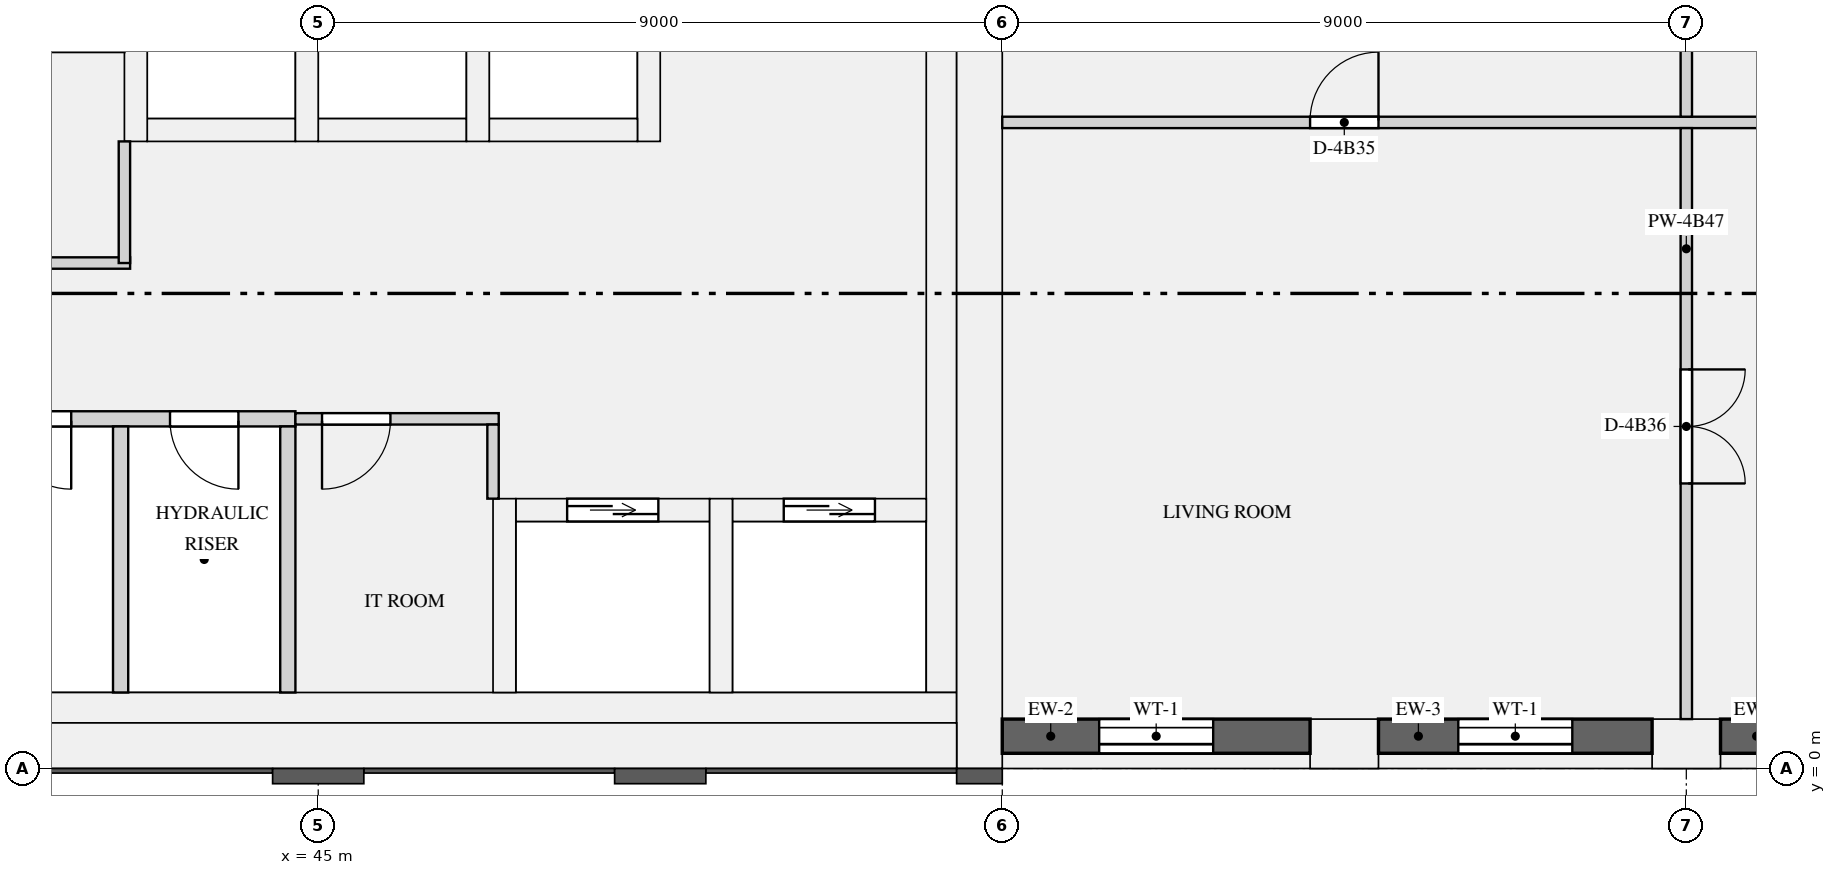
"""IFC4 building model, lengths in metres.
Left out: names, types, materials, properties, quantities, classifications, styles, units other than length and angle.
Written with IfcOpenShell. Run it as: python <this file> out.ifc"""

import sys

from ifc_helpers import new_model, si_unit, direction, frame, frame_2d, origin, origin_2d, place, context, subcontext, project, spatial, rectangle, extrude, element, fill, save


model = new_model("IFC4")
c1 = context("Model", 3, precision=1e-05, world=origin(), true_north=direction((0.0, 1.0)))
c2 = subcontext(c1, "Body", "Model", "MODEL_VIEW")
j1 = project(units=[si_unit("LENGTHUNIT", "METRE"), si_unit("PLANEANGLEUNIT", "RADIAN")], contexts=[c1])
p1 = place(None, origin())
s1 = spatial("IfcSite", under=j1, at=p1, CompositionType="ELEMENT")
p2 = place(p1, origin())
s2 = spatial("IfcBuilding", under=s1, at=p2, CompositionType="ELEMENT")
p3 = place(p2, frame((0.0, 0.0, 207.45)))
s3 = spatial("IfcBuildingStorey", under=s2, at=p3, CompositionType="ELEMENT", Elevation=207.45)
for number, where, z_axis, x_axis in (
    (1, (58.5, 0.325, 0.0), (0.0, 0.0, 1.0), (1.0, 0.0, 0.0)),
    (2, (63.0, 0.325, 0.0), (0.0, 0.0, 1.0), (1.0, 0.0, 0.0)),
):
    element("IfcColumn", number, at=place(p3, frame(where, z_axis=z_axis, x_axis=x_axis)), inside=s3, PredefinedType="USERDEFINED", context=c2, shape_type="SweptSolid", body=[
        extrude(rectangle(XDim=0.9, YDim=0.65, at=origin_2d()), origin(), (0.0, 0.0, 1.0), 3.15),
    ])
p4 = place(p3, frame((53.7, 0.0, 0.0), z_axis=(0.0, 0.0, 1.0), x_axis=(0.0, 1.0, 0.0)))
e3 = element("IfcWall", 3, at=p4, inside=s3, PredefinedType="SHEAR", context=c2, shape_type="SweptSolid", body=[
    extrude(rectangle(XDim=12.5, YDim=0.6, at=frame_2d((6.25, 0.0))), origin(), (0.0, 0.0, 1.0), 3.15),
])
p5 = place(p3, frame((18.6, 0.3, 0.0), z_axis=(0.0, 0.0, 1.0), x_axis=(1.0, 0.0, 0.0)))
e4 = element("IfcWall", 4, at=p5, inside=s3, PredefinedType="SHEAR", context=c2, shape_type="SweptSolid", body=[
    extrude(rectangle(XDim=34.8, YDim=0.6, at=frame_2d((17.4, 0.0))), origin(), (0.0, 0.0, 1.0), 3.15),
])
p6 = place(p3, frame((53.2, 1.0, 0.0), z_axis=(0.0, 0.0, 1.0), x_axis=(0.0, 1.0, 0.0)))
e5 = element("IfcWall", 5, at=p6, inside=s3, PredefinedType="SHEAR", context=c2, shape_type="SweptSolid", body=[
    extrude(rectangle(XDim=10.9, YDim=0.4, at=frame_2d((5.45, 0.0))), origin(), (0.0, 0.0, 1.0), 3.15),
])
p7 = place(p3, frame((18.6, 0.8, 0.0), z_axis=(0.0, 0.0, 1.0), x_axis=(1.0, 0.0, 0.0)))
e6 = element("IfcWall", 6, at=p7, inside=s3, PredefinedType="SHEAR", context=c2, shape_type="SweptSolid", body=[
    extrude(rectangle(XDim=34.8, YDim=0.4, at=frame_2d((17.4, 0.0))), origin(), (0.0, 0.0, 1.0), 3.15),
])
p8 = place(p3, frame((42.75, 8.4, 0.0), z_axis=(0.0, 0.0, 1.0), x_axis=(1.0, 0.0, 0.0)))
e7 = element("IfcWall", 7, at=p8, inside=s3, PredefinedType="SHEAR", context=c2, shape_type="SweptSolid", body=[
    extrude(rectangle(XDim=1.95, YDim=0.3, at=frame_2d((0.975, 0.0))), origin(), (0.0, 0.0, 1.0), 3.15),
])
p9 = place(p3, frame((42.6, 8.25, 0.0), z_axis=(0.0, 0.0, 1.0), x_axis=(0.0, 1.0, 0.0)))
e8 = element("IfcWall", 8, at=p9, inside=s3, PredefinedType="SHEAR", context=c2, shape_type="SweptSolid", body=[
    extrude(rectangle(XDim=3.65, YDim=0.3, at=frame_2d((1.825, 0.0))), origin(), (0.0, 0.0, 1.0), 3.15),
])
p10 = place(p3, frame((45.0, 8.4, 0.0), z_axis=(0.0, 0.0, 1.0), x_axis=(1.0, 0.0, 0.0)))
e9 = element("IfcWall", 9, at=p10, inside=s3, PredefinedType="SHEAR", context=c2, shape_type="SweptSolid", body=[
    extrude(rectangle(XDim=1.95, YDim=0.3, at=frame_2d((0.975, 0.0))), origin(), (0.0, 0.0, 1.0), 3.15),
])
p11 = place(p3, frame((44.85, 8.25, 0.0), z_axis=(0.0, 0.0, 1.0), x_axis=(0.0, 1.0, 0.0)))
e10 = element("IfcWall", 10, at=p11, inside=s3, PredefinedType="SHEAR", context=c2, shape_type="SweptSolid", body=[
    extrude(rectangle(XDim=3.65, YDim=0.3, at=frame_2d((1.825, 0.0))), origin(), (0.0, 0.0, 1.0), 3.15),
])
p12 = place(p3, frame((47.25, 8.4, 0.0), z_axis=(0.0, 0.0, 1.0), x_axis=(1.0, 0.0, 0.0)))
e11 = element("IfcWall", 11, at=p12, inside=s3, PredefinedType="SHEAR", context=c2, shape_type="SweptSolid", body=[
    extrude(rectangle(XDim=1.95, YDim=0.3, at=frame_2d((0.975, 0.0))), origin(), (0.0, 0.0, 1.0), 3.15),
])
for number, where, z_axis, x_axis in (
    (12, (47.1, 8.25, 0.0), (0.0, 0.0, 1.0), (0.0, 1.0, 0.0)),
    (13, (49.35, 8.25, 0.0), (0.0, 0.0, 1.0), (0.0, 1.0, 0.0)),
):
    element("IfcWall", number, at=place(p3, frame(where, z_axis=z_axis, x_axis=x_axis)), inside=s3, PredefinedType="SHEAR", context=c2, shape_type="SweptSolid", body=[
        extrude(rectangle(XDim=3.65, YDim=0.3, at=frame_2d((1.825, 0.0))), origin(), (0.0, 0.0, 1.0), 3.15),
    ])
p13 = place(p3, frame((47.6, 3.4, 0.0), z_axis=(0.0, 0.0, 1.0), x_axis=(1.0, 0.0, 0.0)))
e14 = element("IfcWall", 14, at=p13, inside=s3, PredefinedType="SHEAR", context=c2, shape_type="SweptSolid", body=[
    extrude(rectangle(XDim=2.55, YDim=0.3, at=frame_2d((1.275, 0.0))), origin(), (0.0, 0.0, 1.0), 3.15),
])
p14 = place(p13, frame((0.675, 0.0, 0.0)))
e15 = element("IfcOpeningElement", 15, at=p14, cuts=e14, PredefinedType="OPENING", context=c2, shape_type="SweptSolid", body=[
    extrude(rectangle(XDim=1.2, YDim=2.1, at=frame_2d((0.6, 1.05))), frame((0.0, 0.16, 0.0), z_axis=(0.0, -1.0, 0.0), x_axis=(1.0, 0.0, 0.0)), (0.0, 0.0, 1.0), 0.32),
])
p15 = place(p3, frame((47.45, 1.0, 0.0), z_axis=(0.0, 0.0, 1.0), x_axis=(0.0, 1.0, 0.0)))
e16 = element("IfcWall", 16, at=p15, inside=s3, PredefinedType="SHEAR", context=c2, shape_type="SweptSolid", body=[
    extrude(rectangle(XDim=2.55, YDim=0.3, at=frame_2d((1.275, 0.0))), origin(), (0.0, 0.0, 1.0), 3.15),
])
p16 = place(p3, frame((50.45, 3.4, 0.0), z_axis=(0.0, 0.0, 1.0), x_axis=(1.0, 0.0, 0.0)))
e17 = element("IfcWall", 17, at=p16, inside=s3, PredefinedType="SHEAR", context=c2, shape_type="SweptSolid", body=[
    extrude(rectangle(XDim=2.55, YDim=0.3, at=frame_2d((1.275, 0.0))), origin(), (0.0, 0.0, 1.0), 3.15),
])
p17 = place(p16, frame((0.675, 0.0, 0.0)))
e18 = element("IfcOpeningElement", 18, at=p17, cuts=e17, PredefinedType="OPENING", context=c2, shape_type="SweptSolid", body=[
    extrude(rectangle(XDim=1.2, YDim=2.1, at=frame_2d((0.6, 1.05))), frame((0.0, 0.16, 0.0), z_axis=(0.0, -1.0, 0.0), x_axis=(1.0, 0.0, 0.0)), (0.0, 0.0, 1.0), 0.32),
])
p18 = place(p3, frame((50.3, 1.0, 0.0), z_axis=(0.0, 0.0, 1.0), x_axis=(0.0, 1.0, 0.0)))
e19 = element("IfcWall", 19, at=p18, inside=s3, PredefinedType="SHEAR", context=c2, shape_type="SweptSolid", body=[
    extrude(rectangle(XDim=2.55, YDim=0.3, at=frame_2d((1.275, 0.0))), origin(), (0.0, 0.0, 1.0), 3.15),
])
p19 = place(p3, frame((54.0, 0.425, 0.9), z_axis=(0.0, 0.0, 1.0), x_axis=(1.0, 0.0, 0.0)))
e20 = element("IfcWall", 20, at=p19, inside=s3, PredefinedType="SOLIDWALL", context=c2, shape_type="SweptSolid", body=[
    extrude(rectangle(XDim=4.05, YDim=0.45, at=frame_2d((2.025, 0.0))), origin(), (0.0, 0.0, 1.0), 1.93),
])
p20 = place(p19, frame((1.275, 0.0, 0.15)))
e21 = element("IfcOpeningElement", 21, at=p20, cuts=e20, PredefinedType="OPENING", context=c2, shape_type="SweptSolid", body=[
    extrude(rectangle(XDim=1.5, YDim=1.5, at=frame_2d((0.75, 0.75))), frame((0.0, 0.235, 0.0), z_axis=(0.0, -1.0, 0.0), x_axis=(1.0, 0.0, 0.0)), (0.0, 0.0, 1.0), 0.47),
])
p21 = place(p3, frame((58.95, 0.425, 0.9), z_axis=(0.0, 0.0, 1.0), x_axis=(1.0, 0.0, 0.0)))
e22 = element("IfcWall", 22, at=p21, inside=s3, PredefinedType="SOLIDWALL", context=c2, shape_type="SweptSolid", body=[
    extrude(rectangle(XDim=3.6, YDim=0.45, at=frame_2d((1.8, 0.0))), origin(), (0.0, 0.0, 1.0), 1.93),
])
p22 = place(p21, frame((1.05, 0.0, 0.15)))
e23 = element("IfcOpeningElement", 23, at=p22, cuts=e22, PredefinedType="OPENING", context=c2, shape_type="SweptSolid", body=[
    extrude(rectangle(XDim=1.5, YDim=1.5, at=frame_2d((0.75, 0.75))), frame((0.0, 0.235, 0.0), z_axis=(0.0, -1.0, 0.0), x_axis=(1.0, 0.0, 0.0)), (0.0, 0.0, 1.0), 0.47),
])
p23 = place(p3, frame((63.45, 0.425, 0.9), z_axis=(0.0, 0.0, 1.0), x_axis=(1.0, 0.0, 0.0)))
e24 = element("IfcWall", 24, at=p23, inside=s3, PredefinedType="SOLIDWALL", context=c2, shape_type="SweptSolid", body=[
    extrude(rectangle(XDim=3.4, YDim=0.45, at=frame_2d((1.7, 0.0))), origin(), (0.0, 0.0, 1.0), 1.93),
])
p24 = place(p23, frame((0.95, 0.0, 0.15)))
e25 = element("IfcOpeningElement", 25, at=p24, cuts=e24, PredefinedType="OPENING", context=c2, shape_type="SweptSolid", body=[
    extrude(rectangle(XDim=1.5, YDim=1.5, at=frame_2d((0.75, 0.75))), frame((0.0, 0.235, 0.0), z_axis=(0.0, -1.0, 0.0), x_axis=(1.0, 0.0, 0.0)), (0.0, 0.0, 1.0), 0.47),
])
p25 = place(p3, frame((40.2, 4.6, 0.0), z_axis=(0.0, 0.0, 1.0), x_axis=(1.0, 0.0, 0.0)))
e26 = element("IfcWall", 26, at=p25, inside=s3, PredefinedType="PARTITIONING", context=c2, shape_type="SweptSolid", body=[
    extrude(rectangle(XDim=4.5, YDim=0.2, at=frame_2d((2.25, 0.0))), origin(), (0.0, 0.0, 1.0), 2.83),
])
p26 = place(p25, frame((0.65, 0.0, 0.0)))
e27 = element("IfcOpeningElement", 27, at=p26, cuts=e26, PredefinedType="OPENING", context=c2, shape_type="SweptSolid", body=[
    extrude(rectangle(XDim=0.9, YDim=2.1, at=frame_2d((0.45, 1.05))), frame((0.0, 0.11, 0.0), z_axis=(0.0, -1.0, 0.0), x_axis=(1.0, 0.0, 0.0)), (0.0, 0.0, 1.0), 0.22),
])
p27 = place(p25, frame((2.85, 0.0, 0.0)))
e28 = element("IfcOpeningElement", 28, at=p27, cuts=e26, PredefinedType="OPENING", context=c2, shape_type="SweptSolid", body=[
    extrude(rectangle(XDim=0.9, YDim=2.1, at=frame_2d((0.45, 1.05))), frame((0.0, 0.11, 0.0), z_axis=(0.0, -1.0, 0.0), x_axis=(1.0, 0.0, 0.0)), (0.0, 0.0, 1.0), 0.22),
])
p28 = place(p3, frame((44.7, 4.6, 0.0), z_axis=(0.0, 0.0, 1.0), x_axis=(1.0, 0.0, 0.0)))
e29 = element("IfcWall", 29, at=p28, inside=s3, PredefinedType="PARTITIONING", context=c2, shape_type="SweptSolid", body=[
    extrude(rectangle(XDim=2.675, YDim=0.15, at=frame_2d((1.337, 0.0))), origin(), (0.0, 0.0, 1.0), 2.83),
])
p29 = place(p28, frame((0.35, 0.0, 0.0)))
e30 = element("IfcOpeningElement", 30, at=p29, cuts=e29, PredefinedType="OPENING", context=c2, shape_type="SweptSolid", body=[
    extrude(rectangle(XDim=0.9, YDim=2.1, at=frame_2d((0.45, 1.05))), frame((0.0, 0.085, 0.0), z_axis=(0.0, -1.0, 0.0), x_axis=(1.0, 0.0, 0.0)), (0.0, 0.0, 1.0), 0.17),
])
p30 = place(p3, frame((22.725, 6.65, 0.0), z_axis=(0.0, 0.0, 1.0), x_axis=(1.0, 0.0, 0.0)))
e31 = element("IfcWall", 31, at=p30, inside=s3, PredefinedType="PARTITIONING", context=c2, shape_type="SweptSolid", body=[
    extrude(rectangle(XDim=19.8, YDim=0.15, at=frame_2d((9.9, 0.0))), origin(), (0.0, 0.0, 1.0), 2.83),
])
p31 = place(p30, frame((0.825, 0.0, 0.0)))
e32 = element("IfcOpeningElement", 32, at=p31, cuts=e31, PredefinedType="OPENING", context=c2, shape_type="SweptSolid", body=[
    extrude(rectangle(XDim=0.9, YDim=2.1, at=frame_2d((0.45, 1.05))), frame((0.0, 0.085, 0.0), z_axis=(0.0, -1.0, 0.0), x_axis=(1.0, 0.0, 0.0)), (0.0, 0.0, 1.0), 0.17),
])
p32 = place(p30, frame((4.825, 0.0, 0.0)))
e33 = element("IfcOpeningElement", 33, at=p32, cuts=e31, PredefinedType="OPENING", context=c2, shape_type="SweptSolid", body=[
    extrude(rectangle(XDim=0.9, YDim=2.1, at=frame_2d((0.45, 1.05))), frame((0.0, 0.085, 0.0), z_axis=(0.0, -1.0, 0.0), x_axis=(1.0, 0.0, 0.0)), (0.0, 0.0, 1.0), 0.17),
])
p33 = place(p30, frame((9.825, 0.0, 0.0)))
e34 = element("IfcOpeningElement", 34, at=p33, cuts=e31, PredefinedType="OPENING", context=c2, shape_type="SweptSolid", body=[
    extrude(rectangle(XDim=0.9, YDim=2.1, at=frame_2d((0.45, 1.05))), frame((0.0, 0.085, 0.0), z_axis=(0.0, -1.0, 0.0), x_axis=(1.0, 0.0, 0.0)), (0.0, 0.0, 1.0), 0.17),
])
p34 = place(p30, frame((14.475, 0.0, 0.0)))
e35 = element("IfcOpeningElement", 35, at=p34, cuts=e31, PredefinedType="OPENING", context=c2, shape_type="SweptSolid", body=[
    extrude(rectangle(XDim=0.9, YDim=2.1, at=frame_2d((0.45, 1.05))), frame((0.0, 0.085, 0.0), z_axis=(0.0, -1.0, 0.0), x_axis=(1.0, 0.0, 0.0)), (0.0, 0.0, 1.0), 0.17),
])
for number, where, z_axis, x_axis in (
    (36, (42.4, 1.0, 0.0), (0.0, 0.0, 1.0), (0.0, 1.0, 0.0)),
    (37, (44.6, 1.0, 0.0), (0.0, 0.0, 1.0), (0.0, 1.0, 0.0)),
):
    element("IfcWall", number, at=place(p3, frame(where, z_axis=z_axis, x_axis=x_axis)), inside=s3, PredefinedType="PARTITIONING", context=c2, shape_type="SweptSolid", body=[
        extrude(rectangle(XDim=3.5, YDim=0.2, at=frame_2d((1.75, 0.0))), origin(), (0.0, 0.0, 1.0), 2.83),
    ])
p35 = place(p3, frame((47.3, 3.55, 0.0), z_axis=(0.0, 0.0, 1.0), x_axis=(0.0, 1.0, 0.0)))
e38 = element("IfcWall", 38, at=p35, inside=s3, PredefinedType="PARTITIONING", context=c2, shape_type="SweptSolid", body=[
    extrude(rectangle(XDim=0.975, YDim=0.15, at=frame_2d((0.487, 0.0))), origin(), (0.0, 0.0, 1.0), 2.83),
])
p36 = place(p3, frame((42.45, 6.65, 0.0), z_axis=(0.0, 0.0, 1.0), x_axis=(0.0, 1.0, 0.0)))
e39 = element("IfcWall", 39, at=p36, inside=s3, PredefinedType="PARTITIONING", context=c2, shape_type="SweptSolid", body=[
    extrude(rectangle(XDim=1.6, YDim=0.15, at=frame_2d((0.8, 0.0))), origin(), (0.0, 0.0, 1.0), 2.83),
])
p37 = place(p3, frame((54.0, 8.5, 0.0), z_axis=(0.0, 0.0, 1.0), x_axis=(1.0, 0.0, 0.0)))
e40 = element("IfcWall", 40, at=p37, inside=s3, PredefinedType="PARTITIONING", context=c2, shape_type="SweptSolid", body=[
    extrude(rectangle(XDim=17.35, YDim=0.15, at=frame_2d((8.675, 0.0))), origin(), (0.0, 0.0, 1.0), 2.83),
])
p38 = place(p37, frame((4.05, 0.0, 0.0)))
e41 = element("IfcOpeningElement", 41, at=p38, cuts=e40, PredefinedType="OPENING", context=c2, shape_type="SweptSolid", body=[
    extrude(rectangle(XDim=0.9, YDim=2.1, at=frame_2d((0.45, 1.05))), frame((0.0, 0.085, 0.0), z_axis=(0.0, -1.0, 0.0), x_axis=(1.0, 0.0, 0.0)), (0.0, 0.0, 1.0), 0.17),
])
p39 = place(p3, frame((63.0, 0.65, 0.0), z_axis=(0.0, 0.0, 1.0), x_axis=(0.0, 1.0, 0.0)))
e42 = element("IfcWall", 42, at=p39, inside=s3, PredefinedType="PARTITIONING", context=c2, shape_type="SweptSolid", body=[
    extrude(rectangle(XDim=7.775, YDim=0.15, at=frame_2d((3.888, 0.0))), origin(), (0.0, 0.0, 1.0), 2.83),
])
p40 = place(p39, frame((3.1, 0.0, 0.0)))
e43 = element("IfcOpeningElement", 43, at=p40, cuts=e42, PredefinedType="OPENING", context=c2, shape_type="SweptSolid", body=[
    extrude(rectangle(XDim=1.5, YDim=2.1, at=frame_2d((0.75, 1.05))), frame((0.0, 0.085, 0.0), z_axis=(0.0, -1.0, 0.0), x_axis=(1.0, 0.0, 0.0)), (0.0, 0.0, 1.0), 0.17),
])
p41 = place(p3, frame((63.0, 8.575, 0.0), z_axis=(0.0, 0.0, 1.0), x_axis=(0.0, 1.0, 0.0)))
e44 = element("IfcWall", 44, at=p41, inside=s3, PredefinedType="PARTITIONING", context=c2, shape_type="SweptSolid", body=[
    extrude(rectangle(XDim=3.85, YDim=0.15, at=frame_2d((1.925, 0.0))), origin(), (0.0, 0.0, 1.0), 2.83),
])
p42 = place(p20, origin())
e45 = element("IfcWindow", 45, at=p42, inside=s3, PartitioningType="SINGLE_PANEL", PredefinedType="WINDOW", context=c2, shape_type="SweptSolid", body=[
    extrude(rectangle(XDim=1.5, YDim=1.5, at=frame_2d((0.75, 0.75))), frame((0.0, -0.065, 0.0), z_axis=(0.0, -1.0, 0.0), x_axis=(1.0, 0.0, 0.0)), (0.0, 0.0, 1.0), 0.06),
])
fill(e21, e45)
p43 = place(p22, origin())
e46 = element("IfcWindow", 46, at=p43, inside=s3, PartitioningType="SINGLE_PANEL", PredefinedType="WINDOW", context=c2, shape_type="SweptSolid", body=[
    extrude(rectangle(XDim=1.5, YDim=1.5, at=frame_2d((0.75, 0.75))), frame((0.0, -0.065, 0.0), z_axis=(0.0, -1.0, 0.0), x_axis=(1.0, 0.0, 0.0)), (0.0, 0.0, 1.0), 0.06),
])
fill(e23, e46)
p44 = place(p14, origin())
e47 = element("IfcDoor", 47, at=p44, inside=s3, OperationType="DOUBLE_DOOR_SLIDING", PredefinedType="DOOR", context=c2, shape_type="SweptSolid", body=[
    extrude(rectangle(XDim=1.2, YDim=2.1, at=frame_2d((0.6, 1.05))), frame((0.0, 0.025, 0.0), z_axis=(0.0, -1.0, 0.0), x_axis=(1.0, 0.0, 0.0)), (0.0, 0.0, 1.0), 0.05),
])
fill(e15, e47)
p45 = place(p17, origin())
e48 = element("IfcDoor", 48, at=p45, inside=s3, OperationType="DOUBLE_DOOR_SLIDING", PredefinedType="DOOR", context=c2, shape_type="SweptSolid", body=[
    extrude(rectangle(XDim=1.2, YDim=2.1, at=frame_2d((0.6, 1.05))), frame((0.0, 0.025, 0.0), z_axis=(0.0, -1.0, 0.0), x_axis=(1.0, 0.0, 0.0)), (0.0, 0.0, 1.0), 0.05),
])
fill(e18, e48)
p46 = place(p29, frame((0.9, 0.0, 0.0), z_axis=(0.0, 0.0, 1.0), x_axis=(-1.0, 0.0, 0.0)))
e49 = element("IfcDoor", 49, at=p46, inside=s3, OperationType="SINGLE_SWING_RIGHT", PredefinedType="DOOR", context=c2, shape_type="SweptSolid", body=[
    extrude(rectangle(XDim=0.9, YDim=2.1, at=frame_2d((0.45, 1.05))), frame((0.0, 0.025, 0.0), z_axis=(0.0, -1.0, 0.0), x_axis=(1.0, 0.0, 0.0)), (0.0, 0.0, 1.0), 0.05),
])
fill(e30, e49)
p47 = place(p26, frame((0.9, 0.0, 0.0), z_axis=(0.0, 0.0, 1.0), x_axis=(-1.0, 0.0, 0.0)))
e50 = element("IfcDoor", 50, at=p47, inside=s3, OperationType="SINGLE_SWING_LEFT", PredefinedType="DOOR", context=c2, shape_type="SweptSolid", body=[
    extrude(rectangle(XDim=0.9, YDim=2.1, at=frame_2d((0.45, 1.05))), frame((0.0, 0.025, 0.0), z_axis=(0.0, -1.0, 0.0), x_axis=(1.0, 0.0, 0.0)), (0.0, 0.0, 1.0), 0.05),
])
fill(e27, e50)
p48 = place(p27, frame((0.9, 0.0, 0.0), z_axis=(0.0, 0.0, 1.0), x_axis=(-1.0, 0.0, 0.0)))
e51 = element("IfcDoor", 51, at=p48, inside=s3, OperationType="SINGLE_SWING_LEFT", PredefinedType="DOOR", context=c2, shape_type="SweptSolid", body=[
    extrude(rectangle(XDim=0.9, YDim=2.1, at=frame_2d((0.45, 1.05))), frame((0.0, 0.025, 0.0), z_axis=(0.0, -1.0, 0.0), x_axis=(1.0, 0.0, 0.0)), (0.0, 0.0, 1.0), 0.05),
])
fill(e28, e51)
p49 = place(p38, origin())
e52 = element("IfcDoor", 52, at=p49, inside=s3, OperationType="SINGLE_SWING_RIGHT", PredefinedType="DOOR", context=c2, shape_type="SweptSolid", body=[
    extrude(rectangle(XDim=0.9, YDim=2.1, at=frame_2d((0.45, 1.05))), frame((0.0, 0.025, 0.0), z_axis=(0.0, -1.0, 0.0), x_axis=(1.0, 0.0, 0.0)), (0.0, 0.0, 1.0), 0.05),
])
fill(e41, e52)
p50 = place(p40, frame((1.5, 0.0, 0.0), z_axis=(0.0, 0.0, 1.0), x_axis=(-1.0, 0.0, 0.0)))
e53 = element("IfcDoor", 53, at=p50, inside=s3, OperationType="DOUBLE_DOOR_SINGLE_SWING", PredefinedType="DOOR", context=c2, shape_type="SweptSolid", body=[
    extrude(rectangle(XDim=1.5, YDim=2.1, at=frame_2d((0.75, 1.05))), frame((0.0, 0.025, 0.0), z_axis=(0.0, -1.0, 0.0), x_axis=(1.0, 0.0, 0.0)), (0.0, 0.0, 1.0), 0.05),
])
fill(e43, e53)
save(model, sys.argv[1])
